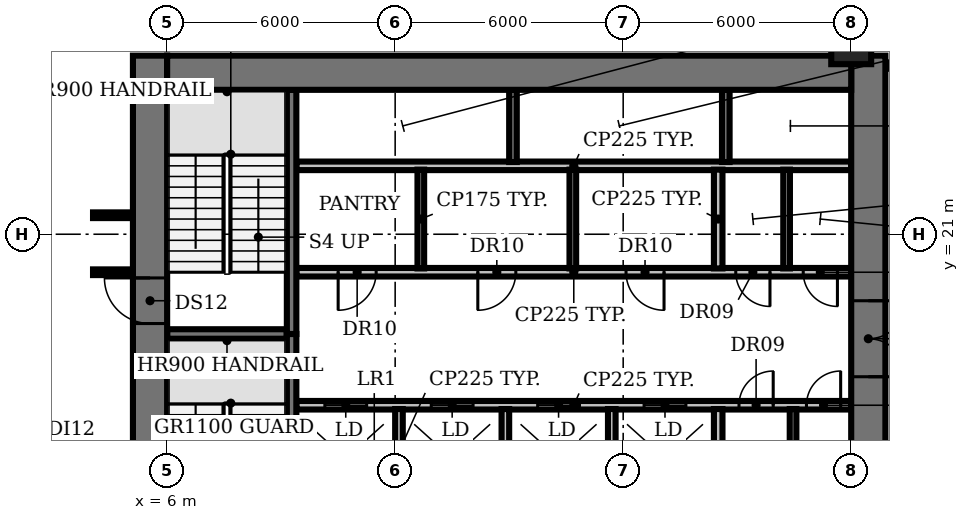
"""IFC4 building model, lengths in metres.
Left out: names, types, materials, properties, quantities, classifications, styles, units other than length and angle.
Written with IfcOpenShell. Run it as: python <this file> out.ifc"""

import sys

from ifc_helpers import new_model, si_unit, direction, frame, frame_2d, origin, origin_2d, place, context, subcontext, project, spatial, rectangle, circle, extrude, element, fill, save


model = new_model("IFC4")
c1 = context("Model", 3, precision=1e-05, world=origin(), true_north=direction((0.0, 1.0)))
c2 = subcontext(c1, "Body", "Model", "MODEL_VIEW")
j1 = project(units=[si_unit("LENGTHUNIT", "METRE"), si_unit("PLANEANGLEUNIT", "RADIAN")], contexts=[c1])
p1 = place(None, origin())
s1 = spatial("IfcSite", under=j1, at=p1, CompositionType="ELEMENT")
p2 = place(p1, origin())
s2 = spatial("IfcBuilding", under=s1, at=p2, CompositionType="ELEMENT")
p3 = place(p2, frame((0.0, 0.0, 54.2)))
s3 = spatial("IfcBuildingStorey", under=s2, at=p3, CompositionType="ELEMENT", Elevation=54.2)
p4 = place(p3, frame((24.0, 26.0, 0.0), z_axis=(0.0, 0.0, 1.0), x_axis=(1.0, 0.0, 0.0)))
e1 = element("IfcColumn", 1, at=p4, inside=s3, PredefinedType="COLUMN", context=c2, shape_type="SweptSolid", body=[
    extrude(circle(Radius=0.525, at=origin_2d()), origin(), (0.0, 0.0, 1.0), 3.85),
])
p5 = place(p3, frame((9.4, 16.5, 0.0), z_axis=(0.0, 0.0, 1.0), x_axis=(1.0, 0.0, 0.0)))
e2 = element("IfcWall", 2, at=p5, inside=s3, PredefinedType="PARTITIONING", context=c2, shape_type="SweptSolid", body=[
    extrude(rectangle(XDim=14.6, YDim=0.225, at=frame_2d((7.3, 0.0))), origin(), (0.0, 0.0, 1.0), 3.85),
])
p6 = place(p5, frame((0.75, 0.0, 0.0)))
e3 = element("IfcOpeningElement", 3, at=p6, cuts=e2, PredefinedType="OPENING", context=c2, shape_type="SweptSolid", body=[
    extrude(rectangle(XDim=1.1, YDim=2.1, at=frame_2d((0.55, 1.05))), frame((0.0, 0.123, 0.0), z_axis=(0.0, -1.0, 0.0), x_axis=(1.0, 0.0, 0.0)), (0.0, 0.0, 1.0), 0.245),
])
p7 = place(p5, frame((3.55, 0.0, 0.0)))
e4 = element("IfcOpeningElement", 4, at=p7, cuts=e2, PredefinedType="OPENING", context=c2, shape_type="SweptSolid", body=[
    extrude(rectangle(XDim=1.1, YDim=2.1, at=frame_2d((0.55, 1.05))), frame((0.0, 0.123, 0.0), z_axis=(0.0, -1.0, 0.0), x_axis=(1.0, 0.0, 0.0)), (0.0, 0.0, 1.0), 0.245),
])
p8 = place(p5, frame((6.35, 0.0, 0.0)))
e5 = element("IfcOpeningElement", 5, at=p8, cuts=e2, PredefinedType="OPENING", context=c2, shape_type="SweptSolid", body=[
    extrude(rectangle(XDim=1.1, YDim=2.1, at=frame_2d((0.55, 1.05))), frame((0.0, 0.123, 0.0), z_axis=(0.0, -1.0, 0.0), x_axis=(1.0, 0.0, 0.0)), (0.0, 0.0, 1.0), 0.245),
])
p9 = place(p5, frame((9.15, 0.0, 0.0)))
e6 = element("IfcOpeningElement", 6, at=p9, cuts=e2, PredefinedType="OPENING", context=c2, shape_type="SweptSolid", body=[
    extrude(rectangle(XDim=1.1, YDim=2.1, at=frame_2d((0.55, 1.05))), frame((0.0, 0.123, 0.0), z_axis=(0.0, -1.0, 0.0), x_axis=(1.0, 0.0, 0.0)), (0.0, 0.0, 1.0), 0.245),
])
p10 = place(p5, frame((11.647, 0.0, 0.0)))
e7 = element("IfcOpeningElement", 7, at=p10, cuts=e2, PredefinedType="OPENING", context=c2, shape_type="SweptSolid", body=[
    extrude(rectangle(XDim=0.9, YDim=2.1, at=frame_2d((0.45, 1.05))), frame((0.0, 0.123, 0.0), z_axis=(0.0, -1.0, 0.0), x_axis=(1.0, 0.0, 0.0)), (0.0, 0.0, 1.0), 0.245),
])
p11 = place(p5, frame((13.423, 0.0, 0.0)))
e8 = element("IfcOpeningElement", 8, at=p11, cuts=e2, PredefinedType="OPENING", context=c2, shape_type="SweptSolid", body=[
    extrude(rectangle(XDim=0.9, YDim=2.1, at=frame_2d((0.45, 1.05))), frame((0.0, 0.123, 0.0), z_axis=(0.0, -1.0, 0.0), x_axis=(1.0, 0.0, 0.0)), (0.0, 0.0, 1.0), 0.245),
])
p12 = place(p3, frame((6.0, 18.375, 0.0), z_axis=(0.0, 0.0, 1.0), x_axis=(1.0, 0.0, 0.0)))
e9 = element("IfcWall", 9, at=p12, inside=s3, PredefinedType="SHEAR", context=c2, shape_type="SweptSolid", body=[
    extrude(rectangle(XDim=3.15, YDim=0.25, at=frame_2d((1.575, 0.0))), origin(), (0.0, 0.0, 1.0), 3.85),
])
p13 = place(p3, frame((24.0, 20.0, 0.0), z_axis=(0.0, 0.0, 1.0), x_axis=(-1.0, 0.0, 0.0)))
e10 = element("IfcWall", 10, at=p13, inside=s3, PredefinedType="PARTITIONING", context=c2, shape_type="SweptSolid", body=[
    extrude(rectangle(XDim=14.6, YDim=0.225, at=frame_2d((7.3, 0.0))), origin(), (0.0, 0.0, 1.0), 3.85),
])
p14 = place(p13, frame((12.5, 0.0, 0.0)))
e11 = element("IfcOpeningElement", 11, at=p14, cuts=e10, PredefinedType="OPENING", context=c2, shape_type="SweptSolid", body=[
    extrude(rectangle(XDim=1.0, YDim=2.1, at=frame_2d((0.5, 1.05))), frame((0.0, 0.123, 0.0), z_axis=(0.0, -1.0, 0.0), x_axis=(1.0, 0.0, 0.0)), (0.0, 0.0, 1.0), 0.245),
])
p15 = place(p13, frame((8.825, 0.0, 0.0)))
e12 = element("IfcOpeningElement", 12, at=p15, cuts=e10, PredefinedType="OPENING", context=c2, shape_type="SweptSolid", body=[
    extrude(rectangle(XDim=1.0, YDim=2.1, at=frame_2d((0.5, 1.05))), frame((0.0, 0.123, 0.0), z_axis=(0.0, -1.0, 0.0), x_axis=(1.0, 0.0, 0.0)), (0.0, 0.0, 1.0), 0.245),
])
p16 = place(p13, frame((4.925, 0.0, 0.0)))
e13 = element("IfcOpeningElement", 13, at=p16, cuts=e10, PredefinedType="OPENING", context=c2, shape_type="SweptSolid", body=[
    extrude(rectangle(XDim=1.0, YDim=2.1, at=frame_2d((0.5, 1.05))), frame((0.0, 0.123, 0.0), z_axis=(0.0, -1.0, 0.0), x_axis=(1.0, 0.0, 0.0)), (0.0, 0.0, 1.0), 0.245),
])
p17 = place(p13, frame((2.137, 0.0, 0.0)))
e14 = element("IfcOpeningElement", 14, at=p17, cuts=e10, PredefinedType="OPENING", context=c2, shape_type="SweptSolid", body=[
    extrude(rectangle(XDim=0.9, YDim=2.1, at=frame_2d((0.45, 1.05))), frame((0.0, 0.123, 0.0), z_axis=(0.0, -1.0, 0.0), x_axis=(1.0, 0.0, 0.0)), (0.0, 0.0, 1.0), 0.245),
])
p18 = place(p13, frame((0.363, 0.0, 0.0)))
e15 = element("IfcOpeningElement", 15, at=p18, cuts=e10, PredefinedType="OPENING", context=c2, shape_type="SweptSolid", body=[
    extrude(rectangle(XDim=0.9, YDim=2.1, at=frame_2d((0.45, 1.05))), frame((0.0, 0.123, 0.0), z_axis=(0.0, -1.0, 0.0), x_axis=(1.0, 0.0, 0.0)), (0.0, 0.0, 1.0), 0.245),
])
p19 = place(p3, frame((9.4, 22.8, 0.0), z_axis=(0.0, 0.0, 1.0), x_axis=(1.0, 0.0, 0.0)))
e16 = element("IfcWall", 16, at=p19, inside=s3, PredefinedType="PARTITIONING", context=c2, shape_type="SweptSolid", body=[
    extrude(rectangle(XDim=14.6, YDim=0.225, at=frame_2d((7.3, 0.0))), origin(), (0.0, 0.0, 1.0), 3.85),
])
p20 = place(p3, frame((9.275, 18.375, 0.0), z_axis=(0.0, 0.0, 1.0), x_axis=(0.0, -1.0, 0.0)))
e17 = element("IfcWall", 17, at=p20, inside=s3, PredefinedType="SHEAR", context=c2, shape_type="SweptSolid", body=[
    extrude(rectangle(XDim=6.55, YDim=0.25, at=frame_2d((3.275, 0.0))), origin(), (0.0, 0.0, 1.0), 3.85),
])
p21 = place(p20, frame((5.075, 0.0, 0.0)))
e18 = element("IfcOpeningElement", 18, at=p21, cuts=e17, PredefinedType="OPENING", context=c2, shape_type="SweptSolid", body=[
    extrude(rectangle(XDim=1.0, YDim=2.1, at=frame_2d((0.5, 1.05))), frame((0.0, 0.135, 0.0), z_axis=(0.0, -1.0, 0.0), x_axis=(1.0, 0.0, 0.0)), (0.0, 0.0, 1.0), 0.27),
])
p22 = place(p3, frame((9.275, 18.375, 0.0), z_axis=(0.0, 0.0, 1.0), x_axis=(0.0, 1.0, 0.0)))
e19 = element("IfcWall", 19, at=p22, inside=s3, PredefinedType="SHEAR", context=c2, shape_type="SweptSolid", body=[
    extrude(rectangle(XDim=6.425, YDim=0.25, at=frame_2d((3.212, 0.0))), origin(), (0.0, 0.0, 1.0), 3.85),
])
p23 = place(p3, frame((12.1, 13.8, 0.0), z_axis=(0.0, 0.0, 1.0), x_axis=(0.0, 1.0, 0.0)))
e20 = element("IfcWall", 20, at=p23, inside=s3, PredefinedType="SOLIDWALL", context=c2, shape_type="SweptSolid", body=[
    extrude(rectangle(XDim=2.6, YDim=0.2, at=frame_2d((1.3, 0.0))), origin(), (0.0, 0.0, 1.0), 3.85),
])
p24 = place(p3, frame((12.675, 20.1, 0.0), z_axis=(0.0, 0.0, 1.0), x_axis=(0.0, 1.0, 0.0)))
e21 = element("IfcWall", 21, at=p24, inside=s3, PredefinedType="PARTITIONING", context=c2, shape_type="SweptSolid", body=[
    extrude(rectangle(XDim=2.6, YDim=0.175, at=frame_2d((1.3, 0.0))), origin(), (0.0, 0.0, 1.0), 3.85),
])
p25 = place(p3, frame((14.9, 13.8, 0.0), z_axis=(0.0, 0.0, 1.0), x_axis=(0.0, 1.0, 0.0)))
e22 = element("IfcWall", 22, at=p25, inside=s3, PredefinedType="SOLIDWALL", context=c2, shape_type="SweptSolid", body=[
    extrude(rectangle(XDim=2.6, YDim=0.2, at=frame_2d((1.3, 0.0))), origin(), (0.0, 0.0, 1.0), 3.85),
])
p26 = place(p3, frame((15.1, 22.9, 0.0), z_axis=(0.0, 0.0, 1.0), x_axis=(0.0, 1.0, 0.0)))
e23 = element("IfcWall", 23, at=p26, inside=s3, PredefinedType="SHEAR", context=c2, shape_type="SweptSolid", body=[
    extrude(rectangle(XDim=1.9, YDim=0.2, at=frame_2d((0.95, 0.0))), origin(), (0.0, 0.0, 1.0), 3.85),
])
p27 = place(p3, frame((16.675, 20.1, 0.0), z_axis=(0.0, 0.0, 1.0), x_axis=(0.0, 1.0, 0.0)))
e24 = element("IfcWall", 24, at=p27, inside=s3, PredefinedType="PARTITIONING", context=c2, shape_type="SweptSolid", body=[
    extrude(rectangle(XDim=2.6, YDim=0.175, at=frame_2d((1.3, 0.0))), origin(), (0.0, 0.0, 1.0), 3.85),
])
p28 = place(p3, frame((17.7, 13.8, 0.0), z_axis=(0.0, 0.0, 1.0), x_axis=(0.0, 1.0, 0.0)))
e25 = element("IfcWall", 25, at=p28, inside=s3, PredefinedType="SOLIDWALL", context=c2, shape_type="SweptSolid", body=[
    extrude(rectangle(XDim=2.6, YDim=0.2, at=frame_2d((1.3, 0.0))), origin(), (0.0, 0.0, 1.0), 3.85),
])
for number, where, z_axis, x_axis in (
    (26, (20.5, 13.8, 0.0), (0.0, 0.0, 1.0), (0.0, 1.0, 0.0)),
    (27, (20.5, 20.1, 0.0), (0.0, 0.0, 1.0), (0.0, 1.0, 0.0)),
):
    element("IfcWall", number, at=place(p3, frame(where, z_axis=z_axis, x_axis=x_axis)), inside=s3, PredefinedType="PARTITIONING", context=c2, shape_type="SweptSolid", body=[
        extrude(rectangle(XDim=2.6, YDim=0.225, at=frame_2d((1.3, 0.0))), origin(), (0.0, 0.0, 1.0), 3.85),
    ])
p29 = place(p3, frame((20.7, 22.9, 0.0), z_axis=(0.0, 0.0, 1.0), x_axis=(0.0, 1.0, 0.0)))
e28 = element("IfcWall", 28, at=p29, inside=s3, PredefinedType="SHEAR", context=c2, shape_type="SweptSolid", body=[
    extrude(rectangle(XDim=1.9, YDim=0.2, at=frame_2d((0.95, 0.0))), origin(), (0.0, 0.0, 1.0), 3.85),
])
for number, where, z_axis, x_axis in (
    (29, (22.3, 20.1, 0.0), (0.0, 0.0, 1.0), (0.0, 1.0, 0.0)),
    (30, (22.47, 13.8, 0.0), (0.0, 0.0, 1.0), (0.0, 1.0, 0.0)),
):
    element("IfcWall", number, at=place(p3, frame(where, z_axis=z_axis, x_axis=x_axis)), inside=s3, PredefinedType="PARTITIONING", context=c2, shape_type="SweptSolid", body=[
        extrude(rectangle(XDim=2.6, YDim=0.175, at=frame_2d((1.3, 0.0))), origin(), (0.0, 0.0, 1.0), 3.85),
    ])
p30 = place(p3, frame((5.55, 4.5, 0.0), z_axis=(0.0, 0.0, 1.0), x_axis=(0.0, 1.0, 0.0)))
e31 = element("IfcWall", 31, at=p30, inside=s3, PredefinedType="SHEAR", context=c2, shape_type="SweptSolid", body=[
    extrude(rectangle(XDim=21.2, YDim=0.9, at=frame_2d((10.6, 0.0))), origin(), (0.0, 0.0, 1.0), 3.85),
])
p31 = place(p30, frame((1.15, 0.0, 0.0)))
e32 = element("IfcOpeningElement", 32, at=p31, cuts=e31, PredefinedType="OPENING", context=c2, shape_type="SweptSolid", body=[
    extrude(rectangle(XDim=1.5, YDim=2.1, at=frame_2d((0.75, 1.05))), frame((0.0, 0.46, 0.0), z_axis=(0.0, -1.0, 0.0), x_axis=(1.0, 0.0, 0.0)), (0.0, 0.0, 1.0), 0.92),
])
p32 = place(p30, frame((7.6, 0.0, 0.0)))
e33 = element("IfcOpeningElement", 33, at=p32, cuts=e31, PredefinedType="OPENING", context=c2, shape_type="SweptSolid", body=[
    extrude(rectangle(XDim=1.2, YDim=2.1, at=frame_2d((0.6, 1.05))), frame((0.0, 0.46, 0.0), z_axis=(0.0, -1.0, 0.0), x_axis=(1.0, 0.0, 0.0)), (0.0, 0.0, 1.0), 0.92),
])
p33 = place(p30, frame((14.15, 0.0, 0.0)))
e34 = element("IfcOpeningElement", 34, at=p33, cuts=e31, PredefinedType="OPENING", context=c2, shape_type="SweptSolid", body=[
    extrude(rectangle(XDim=1.2, YDim=2.1, at=frame_2d((0.6, 1.05))), frame((0.0, 0.46, 0.0), z_axis=(0.0, -1.0, 0.0), x_axis=(1.0, 0.0, 0.0)), (0.0, 0.0, 1.0), 0.92),
])
p34 = place(p3, frame((24.45, 25.7, 0.0), z_axis=(0.0, 0.0, 1.0), x_axis=(0.0, -1.0, 0.0)))
e35 = element("IfcWall", 35, at=p34, inside=s3, PredefinedType="SHEAR", context=c2, shape_type="SweptSolid", body=[
    extrude(rectangle(XDim=21.2, YDim=0.9, at=frame_2d((10.6, 0.0))), origin(), (0.0, 0.0, 1.0), 3.85),
])
p35 = place(p34, frame((18.55, 0.0, 0.0)))
e36 = element("IfcOpeningElement", 36, at=p35, cuts=e35, PredefinedType="OPENING", context=c2, shape_type="SweptSolid", body=[
    extrude(rectangle(XDim=1.5, YDim=2.1, at=frame_2d((0.75, 1.05))), frame((0.0, 0.46, 0.0), z_axis=(0.0, -1.0, 0.0), x_axis=(1.0, 0.0, 0.0)), (0.0, 0.0, 1.0), 0.92),
])
p36 = place(p34, frame((12.45, 0.0, 0.0)))
e37 = element("IfcOpeningElement", 37, at=p36, cuts=e35, PredefinedType="OPENING", context=c2, shape_type="SweptSolid", body=[
    extrude(rectangle(XDim=0.9, YDim=2.1, at=frame_2d((0.45, 1.05))), frame((0.0, 0.46, 0.0), z_axis=(0.0, -1.0, 0.0), x_axis=(1.0, 0.0, 0.0)), (0.0, 0.0, 1.0), 0.92),
])
p37 = place(p34, frame((6.45, 0.0, 0.0)))
e38 = element("IfcOpeningElement", 38, at=p37, cuts=e35, PredefinedType="OPENING", context=c2, shape_type="SweptSolid", body=[
    extrude(rectangle(XDim=2.0, YDim=2.1, at=frame_2d((1.0, 1.05))), frame((0.0, 0.46, 0.0), z_axis=(0.0, -1.0, 0.0), x_axis=(1.0, 0.0, 0.0)), (0.0, 0.0, 1.0), 0.92),
])
p38 = place(p3, frame((6.0, 25.25, 0.0), z_axis=(0.0, 0.0, 1.0), x_axis=(1.0, 0.0, 0.0)))
e39 = element("IfcWall", 39, at=p38, inside=s3, PredefinedType="SHEAR", context=c2, shape_type="SweptSolid", body=[
    extrude(rectangle(XDim=18.0, YDim=0.9, at=frame_2d((9.0, 0.0))), origin(), (0.0, 0.0, 1.0), 3.85),
])
for number, where, z_axis, x_axis in (
    (40, (4.05, 20.0, 0.0), (0.0, 0.0, 1.0), (1.0, 0.0, 0.0)),
    (41, (4.05, 21.5, 0.0), (0.0, 0.0, 1.0), (1.0, 0.0, 0.0)),
):
    element("IfcWall", number, at=place(p3, frame(where, z_axis=z_axis, x_axis=x_axis)), inside=s3, PredefinedType="PARTITIONING", context=c2, shape_type="SweptSolid", body=[
        extrude(rectangle(XDim=1.05, YDim=0.15, at=frame_2d((0.525, 0.0))), origin(), (0.0, 0.0, 1.0), 2.83),
    ])
p39 = place(p3, frame((25.0, 25.43, 0.0), z_axis=(0.0, 0.0, 1.0), x_axis=(1.0, 0.0, 0.0)))
e42 = element("IfcWall", 42, at=p39, inside=s3, PredefinedType="PARTITIONING", context=c2, shape_type="SweptSolid", body=[
    extrude(rectangle(XDim=1.01, YDim=0.15, at=frame_2d((0.505, 0.0))), origin(), (0.0, 0.0, 1.0), 2.83),
])
p40 = place(p6, origin())
e43 = element("IfcDoor", 43, at=p40, inside=s3, OperationType="DOUBLE_DOOR_SLIDING", PredefinedType="DOOR", context=c2, shape_type="SweptSolid", body=[
    extrude(rectangle(XDim=1.1, YDim=2.1, at=frame_2d((0.55, 1.05))), frame((0.0, 0.025, 0.0), z_axis=(0.0, -1.0, 0.0), x_axis=(1.0, 0.0, 0.0)), (0.0, 0.0, 1.0), 0.05),
])
fill(e3, e43)
p41 = place(p7, origin())
e44 = element("IfcDoor", 44, at=p41, inside=s3, OperationType="DOUBLE_DOOR_SLIDING", PredefinedType="DOOR", context=c2, shape_type="SweptSolid", body=[
    extrude(rectangle(XDim=1.1, YDim=2.1, at=frame_2d((0.55, 1.05))), frame((0.0, 0.025, 0.0), z_axis=(0.0, -1.0, 0.0), x_axis=(1.0, 0.0, 0.0)), (0.0, 0.0, 1.0), 0.05),
])
fill(e4, e44)
p42 = place(p8, origin())
e45 = element("IfcDoor", 45, at=p42, inside=s3, OperationType="DOUBLE_DOOR_SLIDING", PredefinedType="DOOR", context=c2, shape_type="SweptSolid", body=[
    extrude(rectangle(XDim=1.1, YDim=2.1, at=frame_2d((0.55, 1.05))), frame((0.0, 0.025, 0.0), z_axis=(0.0, -1.0, 0.0), x_axis=(1.0, 0.0, 0.0)), (0.0, 0.0, 1.0), 0.05),
])
fill(e5, e45)
p43 = place(p9, origin())
e46 = element("IfcDoor", 46, at=p43, inside=s3, OperationType="DOUBLE_DOOR_SLIDING", PredefinedType="DOOR", context=c2, shape_type="SweptSolid", body=[
    extrude(rectangle(XDim=1.1, YDim=2.1, at=frame_2d((0.55, 1.05))), frame((0.0, 0.025, 0.0), z_axis=(0.0, -1.0, 0.0), x_axis=(1.0, 0.0, 0.0)), (0.0, 0.0, 1.0), 0.05),
])
fill(e6, e46)
p44 = place(p10, origin())
e47 = element("IfcDoor", 47, at=p44, inside=s3, OperationType="SINGLE_SWING_RIGHT", PredefinedType="DOOR", context=c2, shape_type="SweptSolid", body=[
    extrude(rectangle(XDim=0.9, YDim=2.1, at=frame_2d((0.45, 1.05))), frame((0.0, 0.025, 0.0), z_axis=(0.0, -1.0, 0.0), x_axis=(1.0, 0.0, 0.0)), (0.0, 0.0, 1.0), 0.05),
])
fill(e7, e47)
p45 = place(p11, origin())
e48 = element("IfcDoor", 48, at=p45, inside=s3, OperationType="SINGLE_SWING_RIGHT", PredefinedType="DOOR", context=c2, shape_type="SweptSolid", body=[
    extrude(rectangle(XDim=0.9, YDim=2.1, at=frame_2d((0.45, 1.05))), frame((0.0, 0.025, 0.0), z_axis=(0.0, -1.0, 0.0), x_axis=(1.0, 0.0, 0.0)), (0.0, 0.0, 1.0), 0.05),
])
fill(e8, e48)
p46 = place(p14, origin())
e49 = element("IfcDoor", 49, at=p46, inside=s3, OperationType="SINGLE_SWING_RIGHT", PredefinedType="DOOR", context=c2, shape_type="SweptSolid", body=[
    extrude(rectangle(XDim=1.0, YDim=2.1, at=frame_2d((0.5, 1.05))), frame((0.0, 0.025, 0.0), z_axis=(0.0, -1.0, 0.0), x_axis=(1.0, 0.0, 0.0)), (0.0, 0.0, 1.0), 0.05),
])
fill(e11, e49)
p47 = place(p15, origin())
e50 = element("IfcDoor", 50, at=p47, inside=s3, OperationType="SINGLE_SWING_RIGHT", PredefinedType="DOOR", context=c2, shape_type="SweptSolid", body=[
    extrude(rectangle(XDim=1.0, YDim=2.1, at=frame_2d((0.5, 1.05))), frame((0.0, 0.025, 0.0), z_axis=(0.0, -1.0, 0.0), x_axis=(1.0, 0.0, 0.0)), (0.0, 0.0, 1.0), 0.05),
])
fill(e12, e50)
p48 = place(p16, origin())
e51 = element("IfcDoor", 51, at=p48, inside=s3, OperationType="SINGLE_SWING_LEFT", PredefinedType="DOOR", context=c2, shape_type="SweptSolid", body=[
    extrude(rectangle(XDim=1.0, YDim=2.1, at=frame_2d((0.5, 1.05))), frame((0.0, 0.025, 0.0), z_axis=(0.0, -1.0, 0.0), x_axis=(1.0, 0.0, 0.0)), (0.0, 0.0, 1.0), 0.05),
])
fill(e13, e51)
p49 = place(p17, origin())
e52 = element("IfcDoor", 52, at=p49, inside=s3, OperationType="SINGLE_SWING_LEFT", PredefinedType="DOOR", context=c2, shape_type="SweptSolid", body=[
    extrude(rectangle(XDim=0.9, YDim=2.1, at=frame_2d((0.45, 1.05))), frame((0.0, 0.025, 0.0), z_axis=(0.0, -1.0, 0.0), x_axis=(1.0, 0.0, 0.0)), (0.0, 0.0, 1.0), 0.05),
])
fill(e14, e52)
p50 = place(p18, origin())
e53 = element("IfcDoor", 53, at=p50, inside=s3, OperationType="SINGLE_SWING_LEFT", PredefinedType="DOOR", context=c2, shape_type="SweptSolid", body=[
    extrude(rectangle(XDim=0.9, YDim=2.1, at=frame_2d((0.45, 1.05))), frame((0.0, 0.025, 0.0), z_axis=(0.0, -1.0, 0.0), x_axis=(1.0, 0.0, 0.0)), (0.0, 0.0, 1.0), 0.05),
])
fill(e15, e53)
p51 = place(p33, origin())
e54 = element("IfcDoor", 54, at=p51, inside=s3, OperationType="SINGLE_SWING_RIGHT", PredefinedType="DOOR", context=c2, shape_type="SweptSolid", body=[
    extrude(rectangle(XDim=1.2, YDim=2.1, at=frame_2d((0.6, 1.05))), frame((0.0, 0.025, 0.0), z_axis=(0.0, -1.0, 0.0), x_axis=(1.0, 0.0, 0.0)), (0.0, 0.0, 1.0), 0.05),
])
fill(e34, e54)
p52 = place(p37, origin())
e55 = element("IfcDoor", 55, at=p52, inside=s3, OperationType="DOUBLE_DOOR_SINGLE_SWING", PredefinedType="DOOR", context=c2, shape_type="SweptSolid", body=[
    extrude(rectangle(XDim=2.0, YDim=2.1, at=frame_2d((1.0, 1.05))), frame((0.0, 0.025, 0.0), z_axis=(0.0, -1.0, 0.0), x_axis=(1.0, 0.0, 0.0)), (0.0, 0.0, 1.0), 0.05),
])
fill(e38, e55)
save(model, sys.argv[1])
